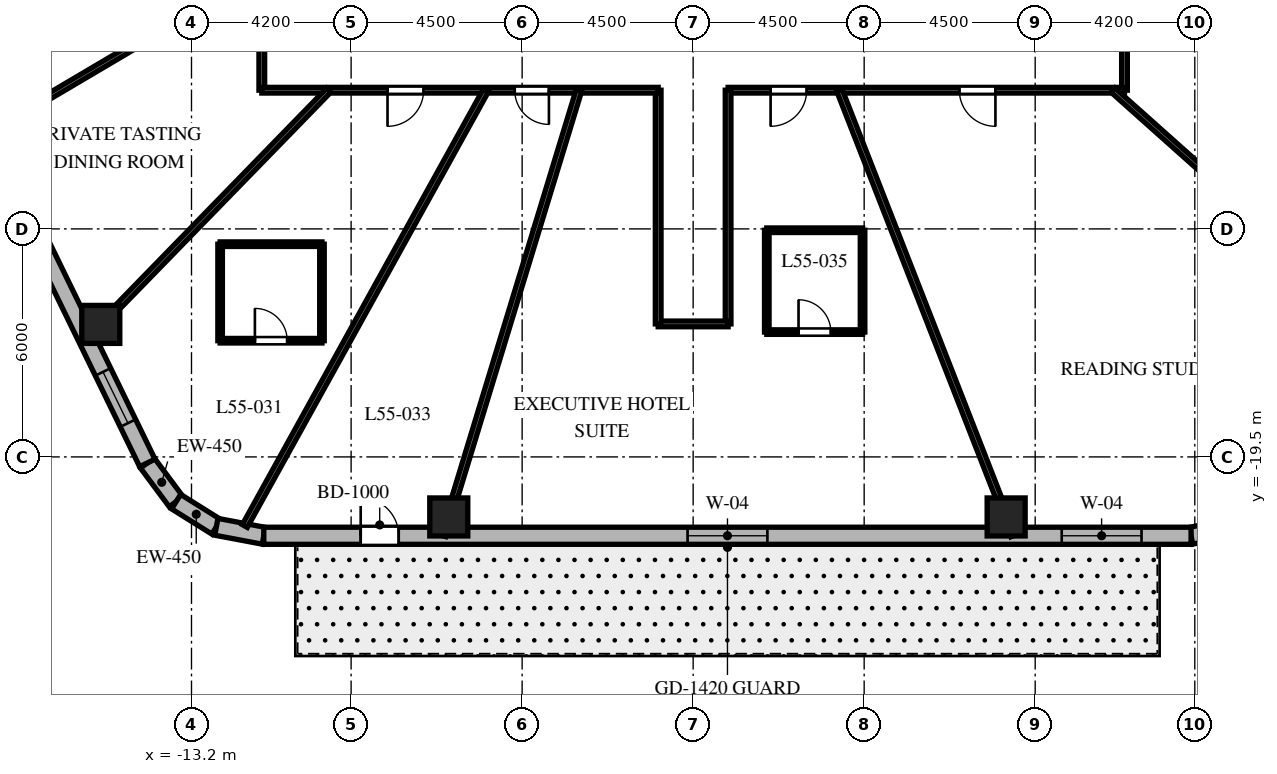
"""IFC4 building model, lengths in metres.
Left out: names, types, materials, properties, quantities, classifications, styles, units other than length and angle.
Written with IfcOpenShell. Run it as: python <this file> out.ifc"""

import sys

from ifc_helpers import new_model, si_unit, direction, frame, frame_2d, origin, origin_2d, place, context, subcontext, project, spatial, rectangle, extrude, element, fill, save


model = new_model("IFC4")
c1 = context("Model", 3, precision=1e-05, world=origin(), true_north=direction((0.0, 1.0)))
c2 = subcontext(c1, "Body", "Model", "MODEL_VIEW")
j1 = project(units=[si_unit("LENGTHUNIT", "METRE"), si_unit("PLANEANGLEUNIT", "RADIAN")], contexts=[c1])
p1 = place(None, origin())
s1 = spatial("IfcSite", under=j1, at=p1, CompositionType="ELEMENT")
p2 = place(p1, origin())
s2 = spatial("IfcBuilding", under=s1, at=p2, CompositionType="ELEMENT")
p3 = place(p2, frame((0.0, 0.0, 221.7)))
s3 = spatial("IfcBuildingStorey", under=s2, at=p3, CompositionType="ELEMENT", Elevation=221.7)
for number, where, z_axis, x_axis in (
    (1, (-6.43, -21.08, 0.0), (0.0, 0.0, 1.0), (1.0, 0.0, 0.0)),
    (2, (8.236, -21.08, 0.0), (0.0, 0.0, 1.0), (1.0, 0.0, 0.0)),
    (3, (-15.587, -16.013, 0.0), (0.0, 0.0, 1.0), (1.0, 0.0, 0.0)),
):
    element("IfcColumn", number, at=place(p3, frame(where, z_axis=z_axis, x_axis=x_axis)), inside=s3, PredefinedType="COLUMN", context=c2, shape_type="SweptSolid", body=[
        extrude(rectangle(XDim=1.0, YDim=1.0, at=origin_2d()), origin(), (0.0, 0.0, 1.0), 3.8),
    ])
p4 = place(p3, frame((-14.362, -19.658, 0.0), z_axis=(0.0, 0.0, 1.0), x_axis=(0.596642462792, -0.80250717853, 0.0)))
e4 = element("IfcWall", 4, at=p4, inside=s3, PredefinedType="SOLIDWALL", context=c2, shape_type="SweptSolid", body=[
    extrude(rectangle(XDim=1.27, YDim=0.45, at=frame_2d((0.635, 0.0))), origin(), (0.0, 0.0, 1.0), 3.5),
])
p5 = place(p3, frame((-13.604, -20.678, 0.0), z_axis=(0.0, 0.0, 1.0), x_axis=(0.847910404124, -0.53013955387, 0.0)))
e5 = element("IfcWall", 5, at=p5, inside=s3, PredefinedType="SOLIDWALL", context=c2, shape_type="SweptSolid", body=[
    extrude(rectangle(XDim=1.249, YDim=0.45, at=frame_2d((0.624, 0.0))), origin(), (0.0, 0.0, 1.0), 3.5),
])
p6 = place(p3, frame((-12.546, -21.34, 0.0), z_axis=(0.0, 0.0, 1.0), x_axis=(0.982686750835, -0.18527479519, 0.0)))
e6 = element("IfcWall", 6, at=p6, inside=s3, PredefinedType="SOLIDWALL", context=c2, shape_type="SweptSolid", body=[
    extrude(rectangle(XDim=1.27, YDim=0.45, at=frame_2d((0.635, 0.0))), origin(), (0.0, 0.0, 1.0), 3.5),
])
p7 = place(p3, frame((13.102, -21.575, 0.0), z_axis=(0.0, 0.0, 1.0), x_axis=(0.978757421505, 0.205021730188, 0.0)))
e7 = element("IfcWall", 7, at=p7, inside=s3, PredefinedType="SOLIDWALL", context=c2, shape_type="SweptSolid", body=[
    extrude(rectangle(XDim=1.406, YDim=0.45, at=frame_2d((0.703, 0.0))), origin(), (0.0, 0.0, 1.0), 3.5),
])
p8 = place(p3, frame((-11.298, -21.575, 0.0), z_axis=(0.0, 0.0, 1.0), x_axis=(1.0, 0.0, 0.0)))
e8 = element("IfcWall", 8, at=p8, inside=s3, PredefinedType="SOLIDWALL", context=c2, shape_type="SweptSolid", body=[
    extrude(rectangle(XDim=24.399, YDim=0.45, at=frame_2d((12.2, 0.0))), origin(), (0.0, 0.0, 1.0), 3.5),
])
p9 = place(p8, frame((2.55, 0.0, 0.0)))
e9 = element("IfcOpeningElement", 9, at=p9, cuts=e8, PredefinedType="OPENING", context=c2, shape_type="SweptSolid", body=[
    extrude(rectangle(XDim=1.0, YDim=2.15, at=frame_2d((0.5, 1.075))), frame((0.0, 0.235, 0.0), z_axis=(0.0, -1.0, 0.0), x_axis=(1.0, 0.0, 0.0)), (0.0, 0.0, 1.0), 0.47),
])
p10 = place(p8, frame((11.151, 0.0, 0.8)))
e10 = element("IfcOpeningElement", 10, at=p10, cuts=e8, PredefinedType="OPENING", context=c2, shape_type="SweptSolid", body=[
    extrude(rectangle(XDim=2.1, YDim=1.85, at=frame_2d((1.05, 0.925))), frame((0.0, 0.235, 0.0), z_axis=(0.0, -1.0, 0.0), x_axis=(1.0, 0.0, 0.0)), (0.0, 0.0, 1.0), 0.47),
])
p11 = place(p8, frame((20.996, 0.0, 0.8)))
e11 = element("IfcOpeningElement", 11, at=p11, cuts=e8, PredefinedType="OPENING", context=c2, shape_type="SweptSolid", body=[
    extrude(rectangle(XDim=2.1, YDim=1.85, at=frame_2d((1.05, 0.925))), frame((0.0, 0.235, 0.0), z_axis=(0.0, -1.0, 0.0), x_axis=(1.0, 0.0, 0.0)), (0.0, 0.0, 1.0), 0.47),
])
p12 = place(p3, frame((-22.74, -2.452, 0.0), z_axis=(0.0, 0.0, 1.0), x_axis=(0.437753424814, -0.899095066755, 0.0)))
e12 = element("IfcWall", 12, at=p12, inside=s3, PredefinedType="SOLIDWALL", context=c2, shape_type="SweptSolid", body=[
    extrude(rectangle(XDim=19.137, YDim=0.45, at=frame_2d((9.569, 0.0))), origin(), (0.0, 0.0, 1.0), 3.5),
])
p13 = place(p12, frame((1.216, 0.0, 0.8)))
e13 = element("IfcOpeningElement", 13, at=p13, cuts=e12, PredefinedType="OPENING", context=c2, shape_type="SweptSolid", body=[
    extrude(rectangle(XDim=1.5, YDim=1.8, at=frame_2d((0.75, 0.9))), frame((0.0, 0.235, 0.0), z_axis=(0.0, -1.0, 0.0), x_axis=(1.0, 0.0, 0.0)), (0.0, 0.0, 1.0), 0.47),
])
p14 = place(p12, frame((6.105, 0.0, 0.8)))
e14 = element("IfcOpeningElement", 14, at=p14, cuts=e12, PredefinedType="OPENING", context=c2, shape_type="SweptSolid", body=[
    extrude(rectangle(XDim=1.5, YDim=1.8, at=frame_2d((0.75, 0.9))), frame((0.0, 0.235, 0.0), z_axis=(0.0, -1.0, 0.0), x_axis=(1.0, 0.0, 0.0)), (0.0, 0.0, 1.0), 0.47),
])
p15 = place(p12, frame((11.499, 0.0, 0.8)))
e15 = element("IfcOpeningElement", 15, at=p15, cuts=e12, PredefinedType="OPENING", context=c2, shape_type="SweptSolid", body=[
    extrude(rectangle(XDim=1.5, YDim=1.8, at=frame_2d((0.75, 0.9))), frame((0.0, 0.235, 0.0), z_axis=(0.0, -1.0, 0.0), x_axis=(1.0, 0.0, 0.0)), (0.0, 0.0, 1.0), 0.47),
])
p16 = place(p12, frame((16.473, 0.0, 0.8)))
e16 = element("IfcOpeningElement", 16, at=p16, cuts=e12, PredefinedType="OPENING", context=c2, shape_type="SweptSolid", body=[
    extrude(rectangle(XDim=1.5, YDim=1.8, at=frame_2d((0.75, 0.9))), frame((0.0, 0.235, 0.0), z_axis=(0.0, -1.0, 0.0), x_axis=(1.0, 0.0, 0.0)), (0.0, 0.0, 1.0), 0.47),
])
p17 = place(p3, frame((-11.35, -9.85, 0.0), z_axis=(0.0, 0.0, 1.0), x_axis=(0.0, 1.0, 0.0)))
e17 = element("IfcWall", 17, at=p17, inside=s3, PredefinedType="PARTITIONING", context=c2, shape_type="SweptSolid", body=[
    extrude(rectangle(XDim=12.4, YDim=0.15, at=frame_2d((6.2, 0.0))), origin(), (0.0, 0.0, 1.0), 2.99),
])
p18 = place(p17, frame((8.835, 0.0, 0.0)))
e18 = element("IfcOpeningElement", 18, at=p18, cuts=e17, PredefinedType="OPENING", context=c2, shape_type="SweptSolid", body=[
    extrude(rectangle(XDim=0.95, YDim=2.03, at=frame_2d((0.475, 1.015))), frame((0.0, 0.085, 0.0), z_axis=(0.0, -1.0, 0.0), x_axis=(1.0, 0.0, 0.0)), (0.0, 0.0, 1.0), 0.17),
])
p19 = place(p17, frame((4.443, 0.0, 0.0)))
e19 = element("IfcOpeningElement", 19, at=p19, cuts=e17, PredefinedType="OPENING", context=c2, shape_type="SweptSolid", body=[
    extrude(rectangle(XDim=0.95, YDim=2.03, at=frame_2d((0.475, 1.015))), frame((0.0, 0.085, 0.0), z_axis=(0.0, -1.0, 0.0), x_axis=(1.0, 0.0, 0.0)), (0.0, 0.0, 1.0), 0.17),
])
p20 = place(p17, frame((1.242, 0.0, 0.0)))
e20 = element("IfcOpeningElement", 20, at=p20, cuts=e17, PredefinedType="OPENING", context=c2, shape_type="SweptSolid", body=[
    extrude(rectangle(XDim=0.9, YDim=2.03, at=frame_2d((0.45, 1.015))), frame((0.0, 0.085, 0.0), z_axis=(0.0, -1.0, 0.0), x_axis=(1.0, 0.0, 0.0)), (0.0, 0.0, 1.0), 0.17),
])
p21 = place(p3, frame((11.35, -4.4, 0.0), z_axis=(0.0, 0.0, 1.0), x_axis=(0.0, -1.0, 0.0)))
e21 = element("IfcWall", 21, at=p21, inside=s3, PredefinedType="PARTITIONING", context=c2, shape_type="SweptSolid", body=[
    extrude(rectangle(XDim=5.45, YDim=0.15, at=frame_2d((2.725, 0.0))), origin(), (0.0, 0.0, 1.0), 2.99),
])
p22 = place(p21, frame((2.466, 0.0, 0.0)))
e22 = element("IfcOpeningElement", 22, at=p22, cuts=e21, PredefinedType="OPENING", context=c2, shape_type="SweptSolid", body=[
    extrude(rectangle(XDim=0.95, YDim=2.03, at=frame_2d((0.475, 1.015))), frame((0.0, 0.085, 0.0), z_axis=(0.0, -1.0, 0.0), x_axis=(1.0, 0.0, 0.0)), (0.0, 0.0, 1.0), 0.17),
])
p23 = place(p3, frame((11.35, -9.85, 0.0), z_axis=(0.0, 0.0, 1.0), x_axis=(-1.0, 0.0, 0.0)))
e23 = element("IfcWall", 23, at=p23, inside=s3, PredefinedType="PARTITIONING", context=c2, shape_type="SweptSolid", body=[
    extrude(rectangle(XDim=10.43, YDim=0.15, at=frame_2d((5.215, 0.0))), origin(), (0.0, 0.0, 1.0), 2.99),
])
p24 = place(p23, frame((8.362, 0.0, 0.0)))
e24 = element("IfcOpeningElement", 24, at=p24, cuts=e23, PredefinedType="OPENING", context=c2, shape_type="SweptSolid", body=[
    extrude(rectangle(XDim=0.95, YDim=2.03, at=frame_2d((0.475, 1.015))), frame((0.0, 0.085, 0.0), z_axis=(0.0, -1.0, 0.0), x_axis=(1.0, 0.0, 0.0)), (0.0, 0.0, 1.0), 0.17),
])
p25 = place(p23, frame((3.396, 0.0, 0.0)))
e25 = element("IfcOpeningElement", 25, at=p25, cuts=e23, PredefinedType="OPENING", context=c2, shape_type="SweptSolid", body=[
    extrude(rectangle(XDim=0.95, YDim=2.03, at=frame_2d((0.475, 1.015))), frame((0.0, 0.085, 0.0), z_axis=(0.0, -1.0, 0.0), x_axis=(1.0, 0.0, 0.0)), (0.0, 0.0, 1.0), 0.17),
])
p26 = place(p3, frame((0.92, -9.85, 0.0), z_axis=(0.0, 0.0, 1.0), x_axis=(0.0, -1.0, 0.0)))
e26 = element("IfcWall", 26, at=p26, inside=s3, PredefinedType="PARTITIONING", context=c2, shape_type="SweptSolid", body=[
    extrude(rectangle(XDim=6.15, YDim=0.15, at=frame_2d((3.075, 0.0))), origin(), (0.0, 0.0, 1.0), 3.027),
])
p27 = place(p3, frame((0.92, -16.0, 0.0), z_axis=(0.0, 0.0, 1.0), x_axis=(-1.0, 0.0, 0.0)))
e27 = element("IfcWall", 27, at=p27, inside=s3, PredefinedType="PARTITIONING", context=c2, shape_type="SweptSolid", body=[
    extrude(rectangle(XDim=1.84, YDim=0.15, at=frame_2d((0.92, 0.0))), origin(), (0.0, 0.0, 1.0), 3.5),
])
p28 = place(p3, frame((-0.92, -16.0, 0.0), z_axis=(0.0, 0.0, 1.0), x_axis=(0.0, 1.0, 0.0)))
e28 = element("IfcWall", 28, at=p28, inside=s3, PredefinedType="PARTITIONING", context=c2, shape_type="SweptSolid", body=[
    extrude(rectangle(XDim=6.15, YDim=0.15, at=frame_2d((3.075, 0.0))), origin(), (0.0, 0.0, 1.0), 3.027),
])
p29 = place(p3, frame((-0.92, -9.85, 0.0), z_axis=(0.0, 0.0, 1.0), x_axis=(-1.0, 0.0, 0.0)))
e29 = element("IfcWall", 29, at=p29, inside=s3, PredefinedType="PARTITIONING", context=c2, shape_type="SweptSolid", body=[
    extrude(rectangle(XDim=10.43, YDim=0.15, at=frame_2d((5.215, 0.0))), origin(), (0.0, 0.0, 1.0), 2.99),
])
p30 = place(p29, frame((6.172, 0.0, 0.0)))
e30 = element("IfcOpeningElement", 30, at=p30, cuts=e29, PredefinedType="OPENING", context=c2, shape_type="SweptSolid", body=[
    extrude(rectangle(XDim=0.95, YDim=2.03, at=frame_2d((0.475, 1.015))), frame((0.0, 0.085, 0.0), z_axis=(0.0, -1.0, 0.0), x_axis=(1.0, 0.0, 0.0)), (0.0, 0.0, 1.0), 0.17),
])
p31 = place(p29, frame((2.875, 0.0, 0.0)))
e31 = element("IfcOpeningElement", 31, at=p31, cuts=e29, PredefinedType="OPENING", context=c2, shape_type="SweptSolid", body=[
    extrude(rectangle(XDim=0.9, YDim=2.03, at=frame_2d((0.45, 1.015))), frame((0.0, 0.085, 0.0), z_axis=(0.0, -1.0, 0.0), x_axis=(1.0, 0.0, 0.0)), (0.0, 0.0, 1.0), 0.17),
])
p32 = place(p3, frame((-11.35, -6.705, 0.0), z_axis=(0.0, 0.0, 1.0), x_axis=(-0.86097625004, -0.508645158108, 0.0)))
e32 = element("IfcWall", 32, at=p32, inside=s3, PredefinedType="PARTITIONING", context=c2, shape_type="SweptSolid", body=[
    extrude(rectangle(XDim=8.406, YDim=0.15, at=frame_2d((4.203, 0.0))), origin(), (0.0, 0.0, 1.0), 2.74),
])
p33 = place(p3, frame((-9.588, -9.85, 0.0), z_axis=(0.0, 0.0, 1.0), x_axis=(-0.697519469595, -0.716565830567, 0.0)))
e33 = element("IfcWall", 33, at=p33, inside=s3, PredefinedType="PARTITIONING", context=c2, shape_type="SweptSolid", body=[
    extrude(rectangle(XDim=9.126, YDim=0.15, at=frame_2d((4.563, 0.0))), origin(), (0.0, 0.0, 1.0), 2.74),
])
p34 = place(p3, frame((-5.451, -9.85, 0.0), z_axis=(0.0, 0.0, 1.0), x_axis=(-0.484188830955, -0.87496352837, 0.0)))
e34 = element("IfcWall", 34, at=p34, inside=s3, PredefinedType="PARTITIONING", context=c2, shape_type="SweptSolid", body=[
    extrude(rectangle(XDim=13.107, YDim=0.15, at=frame_2d((6.553, 0.0))), origin(), (0.0, 0.0, 1.0), 2.74),
])
p35 = place(p3, frame((-3.004, -9.85, 0.0), z_axis=(0.0, 0.0, 1.0), x_axis=(-0.291775760688, -0.956486751333, 0.0)))
e35 = element("IfcWall", 35, at=p35, inside=s3, PredefinedType="PARTITIONING", context=c2, shape_type="SweptSolid", body=[
    extrude(rectangle(XDim=12.258, YDim=0.15, at=frame_2d((6.129, 0.0))), origin(), (0.0, 0.0, 1.0), 2.74),
])
p36 = place(p3, frame((3.848, -9.85, 0.0), z_axis=(0.0, 0.0, 1.0), x_axis=(0.363921778212, -0.931429513889, 0.0)))
e36 = element("IfcWall", 36, at=p36, inside=s3, PredefinedType="PARTITIONING", context=c2, shape_type="SweptSolid", body=[
    extrude(rectangle(XDim=12.588, YDim=0.15, at=frame_2d((6.294, 0.0))), origin(), (0.0, 0.0, 1.0), 2.74),
])
p37 = place(p3, frame((11.048, -9.85, 0.0), z_axis=(0.0, 0.0, 1.0), x_axis=(0.746444434655, -0.665447748492, 0.0)))
e37 = element("IfcWall", 37, at=p37, inside=s3, PredefinedType="PARTITIONING", context=c2, shape_type="SweptSolid", body=[
    extrude(rectangle(XDim=8.732, YDim=0.15, at=frame_2d((4.366, 0.0))), origin(), (0.0, 0.0, 1.0), 2.74),
])
p38 = place(p3, frame((11.35, -5.072, 0.0), z_axis=(0.0, 0.0, 1.0), x_axis=(0.912980177983, -0.408003914944, 0.0)))
e38 = element("IfcWall", 38, at=p38, inside=s3, PredefinedType="PARTITIONING", context=c2, shape_type="SweptSolid", body=[
    extrude(rectangle(XDim=9.358, YDim=0.15, at=frame_2d((4.679, 0.0))), origin(), (0.0, 0.0, 1.0), 2.74),
])
p39 = place(p3, frame((-12.447, -16.442, 0.0), z_axis=(0.0, 0.0, 1.0), x_axis=(1.0, 0.0, 0.0)))
e39 = element("IfcWall", 39, at=p39, inside=s3, PredefinedType="PARTITIONING", context=c2, shape_type="SweptSolid", body=[
    extrude(rectangle(XDim=2.68, YDim=0.12, at=frame_2d((1.34, 0.0))), origin(), (0.0, 0.0, 1.0), 3.5),
])
p40 = place(p39, frame((0.915, 0.0, 0.0)))
e40 = element("IfcOpeningElement", 40, at=p40, cuts=e39, PredefinedType="OPENING", context=c2, shape_type="SweptSolid", body=[
    extrude(rectangle(XDim=0.85, YDim=2.03, at=frame_2d((0.425, 1.015))), frame((0.0, 0.07, 0.0), z_axis=(0.0, -1.0, 0.0), x_axis=(1.0, 0.0, 0.0)), (0.0, 0.0, 1.0), 0.14),
])
p41 = place(p3, frame((-9.767, -16.442, 0.0), z_axis=(0.0, 0.0, 1.0), x_axis=(0.0, 1.0, 0.0)))
e41 = element("IfcWall", 41, at=p41, inside=s3, PredefinedType="PARTITIONING", context=c2, shape_type="SweptSolid", body=[
    extrude(rectangle(XDim=2.54, YDim=0.12, at=frame_2d((1.27, 0.0))), origin(), (0.0, 0.0, 1.0), 3.073),
])
p42 = place(p3, frame((-9.767, -13.902, 0.0), z_axis=(0.0, 0.0, 1.0), x_axis=(-1.0, 0.0, 0.0)))
e42 = element("IfcWall", 42, at=p42, inside=s3, PredefinedType="PARTITIONING", context=c2, shape_type="SweptSolid", body=[
    extrude(rectangle(XDim=2.68, YDim=0.12, at=frame_2d((1.34, 0.0))), origin(), (0.0, 0.0, 1.0), 3.073),
])
p43 = place(p3, frame((-12.447, -13.902, 0.0), z_axis=(0.0, 0.0, 1.0), x_axis=(0.0, -1.0, 0.0)))
e43 = element("IfcWall", 43, at=p43, inside=s3, PredefinedType="PARTITIONING", context=c2, shape_type="SweptSolid", body=[
    extrude(rectangle(XDim=2.54, YDim=0.12, at=frame_2d((1.27, 0.0))), origin(), (0.0, 0.0, 1.0), 3.5),
])
p44 = place(p3, frame((1.938, -16.215, 0.0), z_axis=(0.0, 0.0, 1.0), x_axis=(1.0, 0.0, 0.0)))
e44 = element("IfcWall", 44, at=p44, inside=s3, PredefinedType="PARTITIONING", context=c2, shape_type="SweptSolid", body=[
    extrude(rectangle(XDim=2.52, YDim=0.12, at=frame_2d((1.26, 0.0))), origin(), (0.0, 0.0, 1.0), 3.5),
])
p45 = place(p44, frame((0.835, 0.0, 0.0)))
e45 = element("IfcOpeningElement", 45, at=p45, cuts=e44, PredefinedType="OPENING", context=c2, shape_type="SweptSolid", body=[
    extrude(rectangle(XDim=0.85, YDim=2.03, at=frame_2d((0.425, 1.015))), frame((0.0, 0.07, 0.0), z_axis=(0.0, -1.0, 0.0), x_axis=(1.0, 0.0, 0.0)), (0.0, 0.0, 1.0), 0.14),
])
p46 = place(p3, frame((4.458, -16.215, 0.0), z_axis=(0.0, 0.0, 1.0), x_axis=(0.0, 1.0, 0.0)))
e46 = element("IfcWall", 46, at=p46, inside=s3, PredefinedType="PARTITIONING", context=c2, shape_type="SweptSolid", body=[
    extrude(rectangle(XDim=2.68, YDim=0.12, at=frame_2d((1.34, 0.0))), origin(), (0.0, 0.0, 1.0), 3.027),
])
p47 = place(p3, frame((4.458, -13.535, 0.0), z_axis=(0.0, 0.0, 1.0), x_axis=(-1.0, 0.0, 0.0)))
e47 = element("IfcWall", 47, at=p47, inside=s3, PredefinedType="PARTITIONING", context=c2, shape_type="SweptSolid", body=[
    extrude(rectangle(XDim=2.52, YDim=0.12, at=frame_2d((1.26, 0.0))), origin(), (0.0, 0.0, 1.0), 3.027),
])
p48 = place(p3, frame((1.938, -13.535, 0.0), z_axis=(0.0, 0.0, 1.0), x_axis=(0.0, -1.0, 0.0)))
e48 = element("IfcWall", 48, at=p48, inside=s3, PredefinedType="PARTITIONING", context=c2, shape_type="SweptSolid", body=[
    extrude(rectangle(XDim=2.68, YDim=0.12, at=frame_2d((1.34, 0.0))), origin(), (0.0, 0.0, 1.0), 3.027),
])
p49 = place(p9, origin())
e49 = element("IfcDoor", 49, at=p49, inside=s3, OperationType="SINGLE_SWING_LEFT", PredefinedType="DOOR", context=c2, shape_type="SweptSolid", body=[
    extrude(rectangle(XDim=1.0, YDim=2.15, at=frame_2d((0.5, 1.075))), frame((0.0, 0.025, 0.0), z_axis=(0.0, -1.0, 0.0), x_axis=(1.0, 0.0, 0.0)), (0.0, 0.0, 1.0), 0.05),
])
fill(e9, e49)
p50 = place(p10, origin())
e50 = element("IfcWindow", 50, at=p50, inside=s3, PartitioningType="SINGLE_PANEL", PredefinedType="WINDOW", context=c2, shape_type="SweptSolid", body=[
    extrude(rectangle(XDim=2.1, YDim=1.85, at=frame_2d((1.05, 0.925))), frame((0.0, 0.03, 0.0), z_axis=(0.0, -1.0, 0.0), x_axis=(1.0, 0.0, 0.0)), (0.0, 0.0, 1.0), 0.06),
])
fill(e10, e50)
p51 = place(p11, origin())
e51 = element("IfcWindow", 51, at=p51, inside=s3, PartitioningType="SINGLE_PANEL", PredefinedType="WINDOW", context=c2, shape_type="SweptSolid", body=[
    extrude(rectangle(XDim=2.1, YDim=1.85, at=frame_2d((1.05, 0.925))), frame((0.0, 0.03, 0.0), z_axis=(0.0, -1.0, 0.0), x_axis=(1.0, 0.0, 0.0)), (0.0, 0.0, 1.0), 0.06),
])
fill(e11, e51)
p52 = place(p16, origin())
e52 = element("IfcWindow", 52, at=p52, inside=s3, PartitioningType="SINGLE_PANEL", PredefinedType="WINDOW", context=c2, shape_type="SweptSolid", body=[
    extrude(rectangle(XDim=1.5, YDim=1.8, at=frame_2d((0.75, 0.9))), frame((0.0, 0.03, 0.0), z_axis=(0.0, -1.0, 0.0), x_axis=(1.0, 0.0, 0.0)), (0.0, 0.0, 1.0), 0.06),
])
fill(e16, e52)
p53 = place(p30, origin())
e53 = element("IfcDoor", 53, at=p53, inside=s3, OperationType="SINGLE_SWING_RIGHT", PredefinedType="DOOR", context=c2, shape_type="SweptSolid", body=[
    extrude(rectangle(XDim=0.95, YDim=2.03, at=frame_2d((0.475, 1.015))), frame((0.0, 0.025, 0.0), z_axis=(0.0, -1.0, 0.0), x_axis=(1.0, 0.0, 0.0)), (0.0, 0.0, 1.0), 0.05),
])
fill(e30, e53)
p54 = place(p40, origin())
e54 = element("IfcDoor", 54, at=p54, inside=s3, OperationType="SINGLE_SWING_LEFT", PredefinedType="DOOR", context=c2, shape_type="SweptSolid", body=[
    extrude(rectangle(XDim=0.85, YDim=2.03, at=frame_2d((0.425, 1.015))), frame((0.0, 0.025, 0.0), z_axis=(0.0, -1.0, 0.0), x_axis=(1.0, 0.0, 0.0)), (0.0, 0.0, 1.0), 0.05),
])
fill(e40, e54)
p55 = place(p31, origin())
e55 = element("IfcDoor", 55, at=p55, inside=s3, OperationType="SINGLE_SWING_LEFT", PredefinedType="DOOR", context=c2, shape_type="SweptSolid", body=[
    extrude(rectangle(XDim=0.9, YDim=2.03, at=frame_2d((0.45, 1.015))), frame((0.0, 0.025, 0.0), z_axis=(0.0, -1.0, 0.0), x_axis=(1.0, 0.0, 0.0)), (0.0, 0.0, 1.0), 0.05),
])
fill(e31, e55)
p56 = place(p24, origin())
e56 = element("IfcDoor", 56, at=p56, inside=s3, OperationType="SINGLE_SWING_RIGHT", PredefinedType="DOOR", context=c2, shape_type="SweptSolid", body=[
    extrude(rectangle(XDim=0.95, YDim=2.03, at=frame_2d((0.475, 1.015))), frame((0.0, 0.025, 0.0), z_axis=(0.0, -1.0, 0.0), x_axis=(1.0, 0.0, 0.0)), (0.0, 0.0, 1.0), 0.05),
])
fill(e24, e56)
p57 = place(p45, origin())
e57 = element("IfcDoor", 57, at=p57, inside=s3, OperationType="SINGLE_SWING_LEFT", PredefinedType="DOOR", context=c2, shape_type="SweptSolid", body=[
    extrude(rectangle(XDim=0.85, YDim=2.03, at=frame_2d((0.425, 1.015))), frame((0.0, 0.025, 0.0), z_axis=(0.0, -1.0, 0.0), x_axis=(1.0, 0.0, 0.0)), (0.0, 0.0, 1.0), 0.05),
])
fill(e45, e57)
p58 = place(p25, origin())
e58 = element("IfcDoor", 58, at=p58, inside=s3, OperationType="SINGLE_SWING_LEFT", PredefinedType="DOOR", context=c2, shape_type="SweptSolid", body=[
    extrude(rectangle(XDim=0.95, YDim=2.03, at=frame_2d((0.475, 1.015))), frame((0.0, 0.025, 0.0), z_axis=(0.0, -1.0, 0.0), x_axis=(1.0, 0.0, 0.0)), (0.0, 0.0, 1.0), 0.05),
])
fill(e25, e58)
save(model, sys.argv[1])
